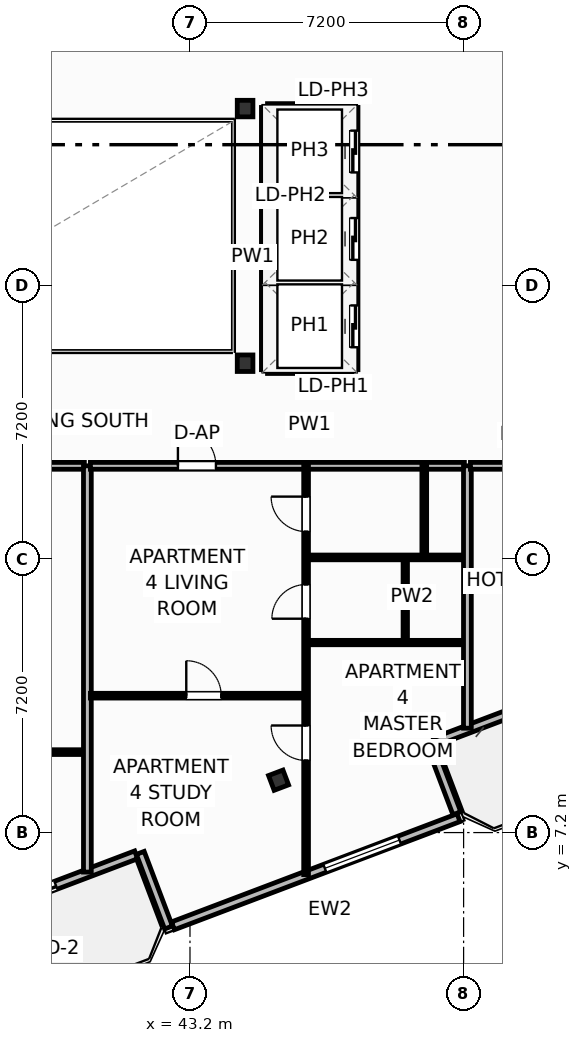
"""IFC4 building model, lengths in metres.
Left out: names, types, materials, properties, quantities, classifications, styles, units other than length and angle.
Written with IfcOpenShell. Run it as: python <this file> out.ifc"""

import sys

from ifc_helpers import new_model, si_unit, direction, frame, frame_2d, origin, origin_2d, place, context, subcontext, project, spatial, rectangle, i_section, extrude, element, fill, save


model = new_model("IFC4")
c1 = context("Model", 3, precision=1e-05, world=origin(), true_north=direction((0.0, 1.0)))
c2 = subcontext(c1, "Body", "Model", "MODEL_VIEW")
j1 = project(units=[si_unit("LENGTHUNIT", "METRE"), si_unit("PLANEANGLEUNIT", "RADIAN")], contexts=[c1])
p1 = place(None, origin())
s1 = spatial("IfcSite", under=j1, at=p1, CompositionType="ELEMENT")
p2 = place(p1, origin())
s2 = spatial("IfcBuilding", under=s1, at=p2, CompositionType="ELEMENT")
p3 = place(p2, frame((0.0, 0.0, 212.7)))
s3 = spatial("IfcBuildingStorey", under=s2, at=p3, CompositionType="ELEMENT", Elevation=212.7)
for number, where, z_axis, x_axis in (
    (1, (44.65, 19.55, 0.0), (0.0, 0.0, 1.0), (1.0, 0.0, 0.0)),
    (2, (44.65, 26.25, 0.0), (0.0, 0.0, 1.0), (1.0, 0.0, 0.0)),
):
    element("IfcColumn", number, at=place(p3, frame(where, z_axis=z_axis, x_axis=x_axis)), inside=s3, PredefinedType="COLUMN", context=c2, shape_type="SweptSolid", body=[
        extrude(i_section(OverallWidth=0.412, OverallDepth=0.435, WebThickness=0.036, FlangeThickness=0.057, FilletRadius=0.025, at=origin_2d()), origin(), (0.0, 0.0, 1.0), 3.7),
    ])
p4 = place(p3, frame((45.531, 8.578, 0.0), z_axis=(0.0, 0.0, 1.0), x_axis=(0.935221751401, 0.354062530786, 0.0)))
e3 = element("IfcColumn", 3, at=p4, inside=s3, PredefinedType="COLUMN", context=c2, shape_type="SweptSolid", body=[
    extrude(i_section(OverallWidth=0.406, OverallDepth=0.416, WebThickness=0.03, FlangeThickness=0.048, FilletRadius=0.025, at=origin_2d()), origin(), (0.0, 0.0, 1.0), 3.7),
])
p5 = place(p3, frame((41.783, 6.614, 0.0), z_axis=(0.0, 0.0, 1.0), x_axis=(-0.93521416643, -0.354082565101, 0.0)))
e4 = element("IfcWall", 4, at=p5, inside=s3, PredefinedType="SOLIDWALL", context=c2, shape_type="SweptSolid", body=[
    extrude(rectangle(XDim=6.0, YDim=0.22, at=frame_2d((3.0, 0.0))), origin(), (0.0, 0.0, 1.0), 2.73),
])
p6 = place(p5, frame((2.26, 0.0, 0.0)))
e5 = element("IfcOpeningElement", 5, at=p6, cuts=e4, PredefinedType="OPENING", context=c2, shape_type="SweptSolid", body=[
    extrude(rectangle(XDim=2.1, YDim=2.3, at=frame_2d((1.05, 1.15))), frame((0.0, 0.12, 0.0), z_axis=(0.0, -1.0, 0.0), x_axis=(1.0, 0.0, 0.0)), (0.0, 0.0, 1.0), 0.24),
])
p7 = place(p3, frame((55.25, 11.713, 0.0), z_axis=(0.0, 0.0, 1.0), x_axis=(-0.935227640088, -0.354046976001, 0.0)))
e6 = element("IfcWall", 6, at=p7, inside=s3, PredefinedType="SOLIDWALL", context=c2, shape_type="SweptSolid", body=[
    extrude(rectangle(XDim=6.0, YDim=0.22, at=frame_2d((3.0, 0.0))), origin(), (0.0, 0.0, 1.0), 2.73),
])
p8 = place(p7, frame((1.516, 0.0, 0.0)))
e7 = element("IfcOpeningElement", 7, at=p8, cuts=e6, PredefinedType="OPENING", context=c2, shape_type="SweptSolid", body=[
    extrude(rectangle(XDim=2.1, YDim=2.3, at=frame_2d((1.05, 1.15))), frame((0.0, 0.12, 0.0), z_axis=(0.0, -1.0, 0.0), x_axis=(1.0, 0.0, 0.0)), (0.0, 0.0, 1.0), 0.24),
])
p9 = place(p3, frame((41.892, 6.666, 0.0), z_axis=(0.0, 0.0, 1.0), x_axis=(0.354128469405, -0.935196785258, 0.0)))
e8 = element("IfcWall", 8, at=p9, inside=s3, PredefinedType="SOLIDWALL", context=c2, shape_type="SweptSolid", body=[
    extrude(rectangle(XDim=2.1, YDim=0.22, at=frame_2d((1.05, 0.0))), origin(), (0.0, 0.0, 1.0), 2.73),
])
p10 = place(p3, frame((42.752, 4.746, 0.0), z_axis=(0.0, 0.0, 1.0), x_axis=(0.935216926991, 0.354075273733, 0.0)))
e9 = element("IfcWall", 9, at=p10, inside=s3, PredefinedType="SOLIDWALL", context=c2, shape_type="SweptSolid", body=[
    extrude(rectangle(XDim=8.035, YDim=0.22, at=frame_2d((4.018, 0.0))), origin(), (0.0, 0.0, 1.0), 2.73),
])
p11 = place(p10, frame((4.273, 0.0, 0.8)))
e10 = element("IfcOpeningElement", 10, at=p11, cuts=e9, PredefinedType="OPENING", context=c2, shape_type="SweptSolid", body=[
    extrude(rectangle(XDim=2.1, YDim=1.75, at=frame_2d((1.05, 0.875))), frame((0.0, 0.12, 0.0), z_axis=(0.0, -1.0, 0.0), x_axis=(1.0, 0.0, 0.0)), (0.0, 0.0, 1.0), 0.24),
])
p12 = place(p3, frame((50.223, 7.708, 0.0), z_axis=(0.0, 0.0, 1.0), x_axis=(-0.354020680661, 0.935237594232, 0.0)))
e11 = element("IfcWall", 11, at=p12, inside=s3, PredefinedType="SOLIDWALL", context=c2, shape_type="SweptSolid", body=[
    extrude(rectangle(XDim=1.975, YDim=0.22, at=frame_2d((0.988, 0.0))), origin(), (0.0, 0.0, 1.0), 2.73),
])
p13 = place(p3, frame((34.815, 9.317, 0.0), z_axis=(0.0, 0.0, 1.0), x_axis=(1.0, 0.0, 0.0)))
e12 = element("IfcWall", 12, at=p13, inside=s3, PredefinedType="PARTITIONING", context=c2, shape_type="SweptSolid", body=[
    extrude(rectangle(XDim=5.605, YDim=0.125, at=frame_2d((2.803, 0.0))), origin(), (0.0, 0.0, 1.0), 3.45),
])
p14 = place(p13, frame((2.522, 0.0, 0.0)))
e13 = element("IfcOpeningElement", 13, at=p14, cuts=e12, PredefinedType="OPENING", context=c2, shape_type="SweptSolid", body=[
    extrude(rectangle(XDim=0.92, YDim=2.05, at=frame_2d((0.46, 1.025))), frame((0.0, 0.073, 0.0), z_axis=(0.0, -1.0, 0.0), x_axis=(1.0, 0.0, 0.0)), (0.0, 0.0, 1.0), 0.145),
])
p15 = place(p3, frame((30.58, 16.85, 0.0), z_axis=(0.0, 0.0, 1.0), x_axis=(1.0, 0.0, 0.0)))
e14 = element("IfcWall", 14, at=p15, inside=s3, PredefinedType="PARTITIONING", context=c2, shape_type="SweptSolid", body=[
    extrude(rectangle(XDim=9.84, YDim=0.18, at=frame_2d((4.92, 0.0))), origin(), (0.0, 0.0, 1.0), 3.45),
])
p16 = place(p15, frame((6.537, 0.0, 0.0)))
e15 = element("IfcOpeningElement", 15, at=p16, cuts=e14, PredefinedType="OPENING", context=c2, shape_type="SweptSolid", body=[
    extrude(rectangle(XDim=1.0, YDim=2.2, at=frame_2d((0.5, 1.1))), frame((0.0, 0.1, 0.0), z_axis=(0.0, -1.0, 0.0), x_axis=(1.0, 0.0, 0.0)), (0.0, 0.0, 1.0), 0.2),
])
p17 = place(p3, frame((40.5, 6.16, 0.0), z_axis=(0.0, 0.0, 1.0), x_axis=(0.0, 1.0, 0.0)))
e16 = element("IfcWall", 16, at=p17, inside=s3, PredefinedType="PARTITIONING", context=c2, shape_type="SweptSolid", body=[
    extrude(rectangle(XDim=10.69, YDim=0.205, at=frame_2d((5.345, 0.0))), origin(), (0.0, 0.0, 1.0), 3.45),
])
p18 = place(p3, frame((40.58, 10.802, 0.0), z_axis=(0.0, 0.0, 1.0), x_axis=(1.0, 0.0, 0.0)))
e17 = element("IfcWall", 17, at=p18, inside=s3, PredefinedType="PARTITIONING", context=c2, shape_type="SweptSolid", body=[
    extrude(rectangle(XDim=5.605, YDim=0.125, at=frame_2d((2.803, 0.0))), origin(), (0.0, 0.0, 1.0), 3.45),
])
p19 = place(p18, frame((2.522, 0.0, 0.0)))
e18 = element("IfcOpeningElement", 18, at=p19, cuts=e17, PredefinedType="OPENING", context=c2, shape_type="SweptSolid", body=[
    extrude(rectangle(XDim=0.92, YDim=2.05, at=frame_2d((0.46, 1.025))), frame((0.0, 0.073, 0.0), z_axis=(0.0, -1.0, 0.0), x_axis=(1.0, 0.0, 0.0)), (0.0, 0.0, 1.0), 0.145),
])
p20 = place(p3, frame((40.58, 16.85, 0.0), z_axis=(0.0, 0.0, 1.0), x_axis=(1.0, 0.0, 0.0)))
e19 = element("IfcWall", 19, at=p20, inside=s3, PredefinedType="PARTITIONING", context=c2, shape_type="SweptSolid", body=[
    extrude(rectangle(XDim=9.84, YDim=0.18, at=frame_2d((4.92, 0.0))), origin(), (0.0, 0.0, 1.0), 3.45),
])
p21 = place(p20, frame((2.302, 0.0, 0.0)))
e20 = element("IfcOpeningElement", 20, at=p21, cuts=e19, PredefinedType="OPENING", context=c2, shape_type="SweptSolid", body=[
    extrude(rectangle(XDim=1.0, YDim=2.2, at=frame_2d((0.5, 1.1))), frame((0.0, 0.1, 0.0), z_axis=(0.0, -1.0, 0.0), x_axis=(1.0, 0.0, 0.0)), (0.0, 0.0, 1.0), 0.2),
])
p22 = place(p3, frame((46.255, 6.094, 0.0), z_axis=(0.0, 0.0, 1.0), x_axis=(0.0, 1.0, 0.0)))
e21 = element("IfcWall", 21, at=p22, inside=s3, PredefinedType="PARTITIONING", context=c2, shape_type="SweptSolid", body=[
    extrude(rectangle(XDim=10.756, YDim=0.125, at=frame_2d((5.378, 0.0))), origin(), (0.0, 0.0, 1.0), 3.45),
])
p23 = place(p22, frame((3.003, 0.0, 0.0)))
e22 = element("IfcOpeningElement", 22, at=p23, cuts=e21, PredefinedType="OPENING", context=c2, shape_type="SweptSolid", body=[
    extrude(rectangle(XDim=0.92, YDim=2.05, at=frame_2d((0.46, 1.025))), frame((0.0, 0.073, 0.0), z_axis=(0.0, -1.0, 0.0), x_axis=(1.0, 0.0, 0.0)), (0.0, 0.0, 1.0), 0.145),
])
p24 = place(p22, frame((6.733, 0.0, 0.0)))
e23 = element("IfcOpeningElement", 23, at=p24, cuts=e21, PredefinedType="OPENING", context=c2, shape_type="SweptSolid", body=[
    extrude(rectangle(XDim=0.9, YDim=2.05, at=frame_2d((0.45, 1.025))), frame((0.0, 0.073, 0.0), z_axis=(0.0, -1.0, 0.0), x_axis=(1.0, 0.0, 0.0)), (0.0, 0.0, 1.0), 0.145),
])
p25 = place(p22, frame((9.026, 0.0, 0.0)))
e24 = element("IfcOpeningElement", 24, at=p25, cuts=e21, PredefinedType="OPENING", context=c2, shape_type="SweptSolid", body=[
    extrude(rectangle(XDim=0.92, YDim=2.05, at=frame_2d((0.46, 1.025))), frame((0.0, 0.073, 0.0), z_axis=(0.0, -1.0, 0.0), x_axis=(1.0, 0.0, 0.0)), (0.0, 0.0, 1.0), 0.145),
])
p26 = place(p3, frame((46.325, 14.44, 0.0), z_axis=(0.0, 0.0, 1.0), x_axis=(1.0, 0.0, 0.0)))
e25 = element("IfcWall", 25, at=p26, inside=s3, PredefinedType="PARTITIONING", context=c2, shape_type="SweptSolid", body=[
    extrude(rectangle(XDim=4.095, YDim=0.125, at=frame_2d((2.047, 0.0))), origin(), (0.0, 0.0, 1.0), 3.45),
])
p27 = place(p3, frame((46.325, 12.2, 0.0), z_axis=(0.0, 0.0, 1.0), x_axis=(1.0, 0.0, 0.0)))
e26 = element("IfcWall", 26, at=p27, inside=s3, PredefinedType="PARTITIONING", context=c2, shape_type="SweptSolid", body=[
    extrude(rectangle(XDim=4.095, YDim=0.115, at=frame_2d((2.047, 0.0))), origin(), (0.0, 0.0, 1.0), 3.45),
])
p28 = place(p3, frame((49.365, 14.44, 0.0), z_axis=(0.0, 0.0, 1.0), x_axis=(0.0, 1.0, 0.0)))
e27 = element("IfcWall", 27, at=p28, inside=s3, PredefinedType="PARTITIONING", context=c2, shape_type="SweptSolid", body=[
    extrude(rectangle(XDim=2.41, YDim=0.125, at=frame_2d((1.205, 0.0))), origin(), (0.0, 0.0, 1.0), 3.45),
])
p29 = place(p3, frame((48.865, 12.2, 0.0), z_axis=(0.0, 0.0, 1.0), x_axis=(0.0, 1.0, 0.0)))
e28 = element("IfcWall", 28, at=p29, inside=s3, PredefinedType="PARTITIONING", context=c2, shape_type="SweptSolid", body=[
    extrude(rectangle(XDim=2.24, YDim=0.115, at=frame_2d((1.12, 0.0))), origin(), (0.0, 0.0, 1.0), 3.45),
])
p30 = place(p3, frame((50.5, 9.946, 0.0), z_axis=(0.0, 0.0, 1.0), x_axis=(0.0, 1.0, 0.0)))
e29 = element("IfcWall", 29, at=p30, inside=s3, PredefinedType="PARTITIONING", context=c2, shape_type="SweptSolid", body=[
    extrude(rectangle(XDim=6.904, YDim=0.205, at=frame_2d((3.452, 0.0))), origin(), (0.0, 0.0, 1.0), 3.45),
])
p31 = place(p3, frame((50.58, 16.85, 0.0), z_axis=(0.0, 0.0, 1.0), x_axis=(1.0, 0.0, 0.0)))
e30 = element("IfcWall", 30, at=p31, inside=s3, PredefinedType="PARTITIONING", context=c2, shape_type="SweptSolid", body=[
    extrude(rectangle(XDim=23.404, YDim=0.18, at=frame_2d((11.702, 0.0))), origin(), (0.0, 0.0, 1.0), 3.45),
])
p32 = place(p31, frame((0.935, 0.0, 0.0)))
e31 = element("IfcOpeningElement", 31, at=p32, cuts=e30, PredefinedType="OPENING", context=c2, shape_type="SweptSolid", body=[
    extrude(rectangle(XDim=0.95, YDim=2.15, at=frame_2d((0.475, 1.075))), frame((0.0, 0.1, 0.0), z_axis=(0.0, -1.0, 0.0), x_axis=(1.0, 0.0, 0.0)), (0.0, 0.0, 1.0), 0.2),
])
for number, where, z_axis, x_axis in (
    (32, (45.24, 21.675, 0.0), (0.0, 0.0, 1.0), (1.0, 0.0, 0.0)),
    (33, (45.24, 23.975, 0.0), (0.0, 0.0, 1.0), (1.0, 0.0, 0.0)),
):
    element("IfcWall", number, at=place(p3, frame(where, z_axis=z_axis, x_axis=x_axis)), inside=s3, PredefinedType="PARTITIONING", context=c2, shape_type="SweptSolid", body=[
        extrude(rectangle(XDim=2.22, YDim=0.2, at=frame_2d((1.11, 0.0))), origin(), (0.0, 0.0, 1.0), 3.45),
    ])
p33 = place(p3, frame((45.24, 19.38, 0.0), z_axis=(0.0, 0.0, 1.0), x_axis=(1.0, 0.0, 0.0)))
e34 = element("IfcWall", 34, at=p33, inside=s3, PredefinedType="PARTITIONING", context=c2, shape_type="SweptSolid", body=[
    extrude(rectangle(XDim=2.22, YDim=0.2, at=frame_2d((1.11, 0.0))), origin(), (0.0, 0.0, 1.0), 2.662),
])
p34 = place(p3, frame((45.24, 26.28, 0.0), z_axis=(0.0, 0.0, 1.0), x_axis=(1.0, 0.0, 0.0)))
e35 = element("IfcWall", 35, at=p34, inside=s3, PredefinedType="PARTITIONING", context=c2, shape_type="SweptSolid", body=[
    extrude(rectangle(XDim=2.22, YDim=0.2, at=frame_2d((1.11, 0.0))), origin(), (0.0, 0.0, 1.0), 3.45),
])
p35 = place(p3, frame((45.18, 19.38, 0.0), z_axis=(0.0, 0.0, 1.0), x_axis=(0.0, 1.0, 0.0)))
e36 = element("IfcWall", 36, at=p35, inside=s3, PredefinedType="PARTITIONING", context=c2, shape_type="SweptSolid", body=[
    extrude(rectangle(XDim=6.9, YDim=0.2, at=frame_2d((3.45, 0.0))), origin(), (0.0, 0.0, 1.0), 3.45),
])
p36 = place(p3, frame((47.52, 19.38, 0.0), z_axis=(0.0, 0.0, 1.0), x_axis=(0.0, 1.0, 0.0)))
e37 = element("IfcWall", 37, at=p36, inside=s3, PredefinedType="PARTITIONING", context=c2, shape_type="SweptSolid", body=[
    extrude(rectangle(XDim=6.9, YDim=0.2, at=frame_2d((3.45, 0.0))), origin(), (0.0, 0.0, 1.0), 3.45),
])
p37 = place(p36, frame((0.59, 0.0, 0.0)))
e38 = element("IfcOpeningElement", 38, at=p37, cuts=e37, PredefinedType="OPENING", context=c2, shape_type="SweptSolid", body=[
    extrude(rectangle(XDim=1.1, YDim=2.15, at=frame_2d((0.55, 1.075))), frame((0.0, 0.11, 0.0), z_axis=(0.0, -1.0, 0.0), x_axis=(1.0, 0.0, 0.0)), (0.0, 0.0, 1.0), 0.22),
])
p38 = place(p36, frame((2.89, 0.0, 0.0)))
e39 = element("IfcOpeningElement", 39, at=p38, cuts=e37, PredefinedType="OPENING", context=c2, shape_type="SweptSolid", body=[
    extrude(rectangle(XDim=1.1, YDim=2.15, at=frame_2d((0.55, 1.075))), frame((0.0, 0.11, 0.0), z_axis=(0.0, -1.0, 0.0), x_axis=(1.0, 0.0, 0.0)), (0.0, 0.0, 1.0), 0.22),
])
p39 = place(p36, frame((5.19, 0.0, 0.0)))
e40 = element("IfcOpeningElement", 40, at=p39, cuts=e37, PredefinedType="OPENING", context=c2, shape_type="SweptSolid", body=[
    extrude(rectangle(XDim=1.1, YDim=2.15, at=frame_2d((0.55, 1.075))), frame((0.0, 0.11, 0.0), z_axis=(0.0, -1.0, 0.0), x_axis=(1.0, 0.0, 0.0)), (0.0, 0.0, 1.0), 0.22),
])
p40 = place(p6, origin())
e41 = element("IfcDoor", 41, at=p40, inside=s3, OperationType="SLIDING_TO_LEFT", PredefinedType="DOOR", context=c2, shape_type="SweptSolid", body=[
    extrude(rectangle(XDim=2.1, YDim=2.3, at=frame_2d((1.05, 1.15))), frame((0.0, 0.025, 0.0), z_axis=(0.0, -1.0, 0.0), x_axis=(1.0, 0.0, 0.0)), (0.0, 0.0, 1.0), 0.05),
])
fill(e5, e41)
p41 = place(p11, origin())
e42 = element("IfcWindow", 42, at=p41, inside=s3, PartitioningType="SINGLE_PANEL", PredefinedType="WINDOW", context=c2, shape_type="SweptSolid", body=[
    extrude(rectangle(XDim=2.1, YDim=1.75, at=frame_2d((1.05, 0.875))), frame((0.0, 0.03, 0.0), z_axis=(0.0, -1.0, 0.0), x_axis=(1.0, 0.0, 0.0)), (0.0, 0.0, 1.0), 0.06),
])
fill(e10, e42)
p42 = place(p19, origin())
e43 = element("IfcDoor", 43, at=p42, inside=s3, OperationType="SINGLE_SWING_LEFT", PredefinedType="DOOR", context=c2, shape_type="SweptSolid", body=[
    extrude(rectangle(XDim=0.92, YDim=2.05, at=frame_2d((0.46, 1.025))), frame((0.0, 0.025, 0.0), z_axis=(0.0, -1.0, 0.0), x_axis=(1.0, 0.0, 0.0)), (0.0, 0.0, 1.0), 0.05),
])
fill(e18, e43)
p43 = place(p21, origin())
e44 = element("IfcDoor", 44, at=p43, inside=s3, OperationType="SINGLE_SWING_LEFT", PredefinedType="DOOR", context=c2, shape_type="SweptSolid", body=[
    extrude(rectangle(XDim=1.0, YDim=2.2, at=frame_2d((0.5, 1.1))), frame((0.0, 0.025, 0.0), z_axis=(0.0, -1.0, 0.0), x_axis=(1.0, 0.0, 0.0)), (0.0, 0.0, 1.0), 0.05),
])
fill(e20, e44)
p44 = place(p23, origin())
e45 = element("IfcDoor", 45, at=p44, inside=s3, OperationType="SINGLE_SWING_RIGHT", PredefinedType="DOOR", context=c2, shape_type="SweptSolid", body=[
    extrude(rectangle(XDim=0.92, YDim=2.05, at=frame_2d((0.46, 1.025))), frame((0.0, 0.025, 0.0), z_axis=(0.0, -1.0, 0.0), x_axis=(1.0, 0.0, 0.0)), (0.0, 0.0, 1.0), 0.05),
])
fill(e22, e45)
p45 = place(p24, origin())
e46 = element("IfcDoor", 46, at=p45, inside=s3, OperationType="SINGLE_SWING_LEFT", PredefinedType="DOOR", context=c2, shape_type="SweptSolid", body=[
    extrude(rectangle(XDim=0.9, YDim=2.05, at=frame_2d((0.45, 1.025))), frame((0.0, 0.025, 0.0), z_axis=(0.0, -1.0, 0.0), x_axis=(1.0, 0.0, 0.0)), (0.0, 0.0, 1.0), 0.05),
])
fill(e23, e46)
p46 = place(p25, origin())
e47 = element("IfcDoor", 47, at=p46, inside=s3, OperationType="SINGLE_SWING_RIGHT", PredefinedType="DOOR", context=c2, shape_type="SweptSolid", body=[
    extrude(rectangle(XDim=0.92, YDim=2.05, at=frame_2d((0.46, 1.025))), frame((0.0, 0.025, 0.0), z_axis=(0.0, -1.0, 0.0), x_axis=(1.0, 0.0, 0.0)), (0.0, 0.0, 1.0), 0.05),
])
fill(e24, e47)
p47 = place(p37, origin())
e48 = element("IfcDoor", 48, at=p47, inside=s3, OperationType="SLIDING_TO_LEFT", PredefinedType="DOOR", context=c2, shape_type="SweptSolid", body=[
    extrude(rectangle(XDim=1.1, YDim=2.15, at=frame_2d((0.55, 1.075))), frame((0.0, 0.025, 0.0), z_axis=(0.0, -1.0, 0.0), x_axis=(1.0, 0.0, 0.0)), (0.0, 0.0, 1.0), 0.05),
])
fill(e38, e48)
p48 = place(p38, origin())
e49 = element("IfcDoor", 49, at=p48, inside=s3, OperationType="SLIDING_TO_LEFT", PredefinedType="DOOR", context=c2, shape_type="SweptSolid", body=[
    extrude(rectangle(XDim=1.1, YDim=2.15, at=frame_2d((0.55, 1.075))), frame((0.0, 0.025, 0.0), z_axis=(0.0, -1.0, 0.0), x_axis=(1.0, 0.0, 0.0)), (0.0, 0.0, 1.0), 0.05),
])
fill(e39, e49)
p49 = place(p39, origin())
e50 = element("IfcDoor", 50, at=p49, inside=s3, OperationType="SLIDING_TO_LEFT", PredefinedType="DOOR", context=c2, shape_type="SweptSolid", body=[
    extrude(rectangle(XDim=1.1, YDim=2.15, at=frame_2d((0.55, 1.075))), frame((0.0, 0.025, 0.0), z_axis=(0.0, -1.0, 0.0), x_axis=(1.0, 0.0, 0.0)), (0.0, 0.0, 1.0), 0.05),
])
fill(e40, e50)
save(model, sys.argv[1])
